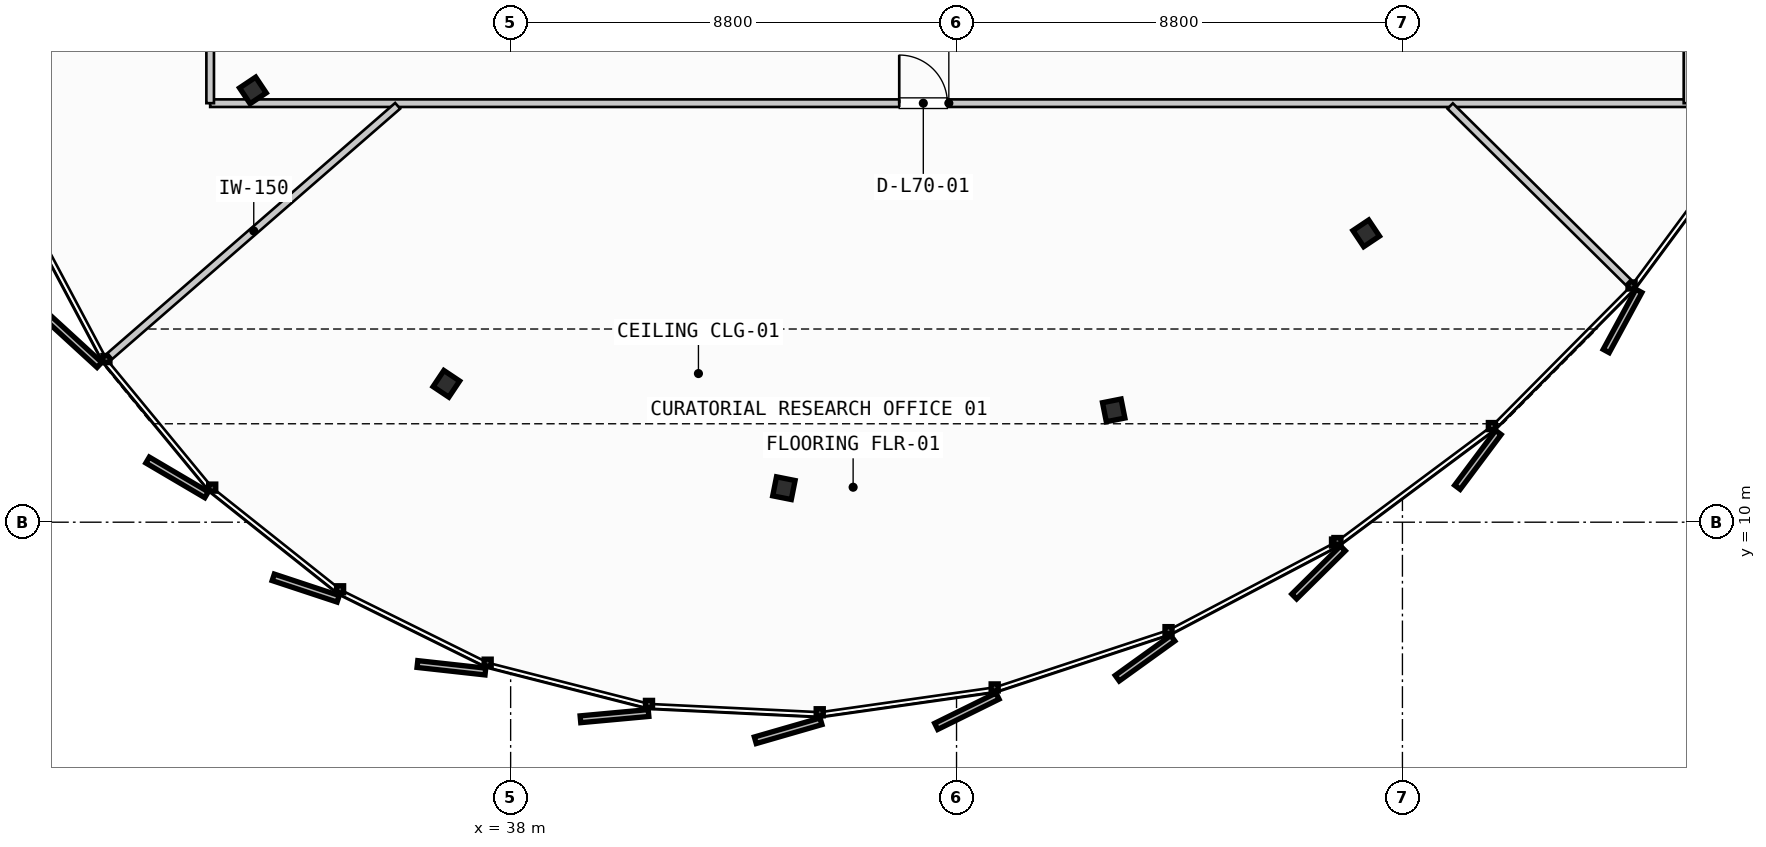
"""IFC4 building model, lengths in metres.
Left out: names, types, materials, properties, quantities, classifications, styles, units other than length and angle.
Written with IfcOpenShell. Run it as: python <this file> out.ifc"""

import sys

from ifc_helpers import new_model, si_unit, direction, frame, frame_2d, origin, origin_2d, place, context, subcontext, project, spatial, rectangle, i_section, extrude, source, transform, mapped, element, fill, save


model = new_model("IFC4")
c1 = context("Model", 3, precision=1e-05, world=origin(), true_north=direction((0.0, 1.0)))
c2 = subcontext(c1, "Body", "Model", "MODEL_VIEW")
j1 = project(units=[si_unit("LENGTHUNIT", "METRE"), si_unit("PLANEANGLEUNIT", "RADIAN")], contexts=[c1])
p1 = place(None, origin())
s1 = spatial("IfcSite", under=j1, at=p1, CompositionType="ELEMENT")
p2 = place(p1, origin())
s2 = spatial("IfcBuilding", under=s1, at=p2, CompositionType="ELEMENT")
p3 = place(p2, frame((0.0, 0.0, 266.35)))
s3 = spatial("IfcBuildingStorey", under=s2, at=p3, CompositionType="ELEMENT", Elevation=266.35)
m1 = source(origin(), c2, "Body", "SweptSolid", [
    extrude(i_section(OverallWidth=0.374, OverallDepth=0.383, WebThickness=0.017, FlangeThickness=0.026, FilletRadius=0.015, at=origin_2d()), origin(), (0.0, 0.0, 1.0), 3.21),
])
for number, where, z_axis, x_axis in (
    (1, (32.913, 18.521, 0.0), (0.0, 0.0, 1.0), (-0.831, -0.556, 0.0)),
    (2, (36.731, 12.731, 0.0), (0.0, 0.0, 1.0), (-0.556, -0.831, 0.0)),
    (3, (43.393, 10.671, 0.0), (0.0, 0.0, 1.0), (-0.195, -0.981, 0.0)),
    (4, (49.902, 12.207, 0.0), (0.0, 0.0, 1.0), (0.195, -0.981, 0.0)),
    (5, (54.885, 15.7, 0.0), (0.0, 0.0, 1.0), (0.556, -0.831, 0.0)),
):
    element("IfcColumn", number, at=place(p3, frame(where, z_axis=z_axis, x_axis=x_axis)), inside=s3, PredefinedType="COLUMN", context=c2, shape_type="MappedRepresentation", body=[
        mapped(m1, transform((0.0, 0.0, 0.0), scale=1.0)),
    ])
p4 = place(p3, frame((32.07, 18.269, 0.0), z_axis=(0.0, 0.0, 1.0), x_axis=(1.0, 0.0, 0.0)))
e6 = element("IfcWall", 6, at=p4, inside=s3, PredefinedType="PARTITIONING", context=c2, shape_type="SweptSolid", body=[
    extrude(rectangle(XDim=29.156, YDim=0.15, at=frame_2d((14.578, 0.0))), origin(), (0.0, 0.0, 1.0), 2.595),
])
p5 = place(p4, frame((13.599, 0.0, 0.0)))
e7 = element("IfcOpeningElement", 7, at=p5, cuts=e6, PredefinedType="OPENING", context=c2, shape_type="SweptSolid", body=[
    extrude(rectangle(XDim=0.95, YDim=2.15, at=frame_2d((0.475, 1.075))), frame((0.0, 0.085, 0.0), z_axis=(0.0, -1.0, 0.0), x_axis=(1.0, 0.0, 0.0)), (0.0, 0.0, 1.0), 0.17),
])
p6 = place(p3, frame((61.226, 18.269, 0.0), z_axis=(0.0, 0.0, 1.0), x_axis=(0.0, 1.0, 0.0)))
e8 = element("IfcWall", 8, at=p6, inside=s3, PredefinedType="PARTITIONING", context=c2, shape_type="SweptSolid", body=[
    extrude(rectangle(XDim=18.831, YDim=0.15, at=frame_2d((9.416, 0.0))), origin(), (0.0, 0.0, 1.0), 2.595),
])
p7 = place(p6, frame((8.028, 0.0, 0.0)))
e9 = element("IfcOpeningElement", 9, at=p7, cuts=e8, PredefinedType="OPENING", context=c2, shape_type="SweptSolid", body=[
    extrude(rectangle(XDim=0.95, YDim=2.15, at=frame_2d((0.475, 1.075))), frame((0.0, 0.085, 0.0), z_axis=(0.0, -1.0, 0.0), x_axis=(1.0, 0.0, 0.0)), (0.0, 0.0, 1.0), 0.17),
])
p8 = place(p3, frame((32.07, 37.1, 0.0), z_axis=(0.0, 0.0, 1.0), x_axis=(0.0, -1.0, 0.0)))
e10 = element("IfcWall", 10, at=p8, inside=s3, PredefinedType="PARTITIONING", context=c2, shape_type="SweptSolid", body=[
    extrude(rectangle(XDim=18.831, YDim=0.15, at=frame_2d((9.416, 0.0))), origin(), (0.0, 0.0, 1.0), 2.595),
])
p9 = place(p8, frame((9.772, 0.0, 0.0)))
e11 = element("IfcOpeningElement", 11, at=p9, cuts=e10, PredefinedType="OPENING", context=c2, shape_type="SweptSolid", body=[
    extrude(rectangle(XDim=0.95, YDim=2.15, at=frame_2d((0.475, 1.075))), frame((0.0, 0.085, 0.0), z_axis=(0.0, -1.0, 0.0), x_axis=(1.0, 0.0, 0.0)), (0.0, 0.0, 1.0), 0.17),
])
p10 = place(p3, frame((35.77, 18.217, 0.0), z_axis=(0.0, 0.0, 1.0), x_axis=(-0.754644626674, -0.656133742031, 0.0)))
e12 = element("IfcWall", 12, at=p10, inside=s3, PredefinedType="PARTITIONING", context=c2, shape_type="SweptSolid", body=[
    extrude(rectangle(XDim=7.527, YDim=0.15, at=frame_2d((3.763, 0.0))), origin(), (0.0, 0.0, 1.0), 2.595),
])
p11 = place(p3, frame((56.542, 18.213, 0.0), z_axis=(0.0, 0.0, 1.0), x_axis=(0.710873734805, -0.703319652195, 0.0)))
e13 = element("IfcWall", 13, at=p11, inside=s3, PredefinedType="PARTITIONING", context=c2, shape_type="SweptSolid", body=[
    extrude(rectangle(XDim=4.945, YDim=0.15, at=frame_2d((2.472, 0.0))), origin(), (0.0, 0.0, 1.0), 2.595),
])
m2 = source(origin(), c2, "Body", "SweptSolid", [
    extrude(rectangle(XDim=0.95, YDim=2.15, at=frame_2d((0.475, 1.075))), frame((0.0, 0.025, 0.0), z_axis=(0.0, -1.0, 0.0), x_axis=(1.0, 0.0, 0.0)), (0.0, 0.0, 1.0), 0.05),
])
p12 = place(p5, origin())
e14 = element("IfcDoor", 14, at=p12, inside=s3, OperationType="SINGLE_SWING_LEFT", PredefinedType="DOOR", context=c2, shape_type="MappedRepresentation", body=[
    mapped(m2, transform((0.0, 0.0, 0.0), scale=1.0)),
])
fill(e7, e14)
save(model, sys.argv[1])
